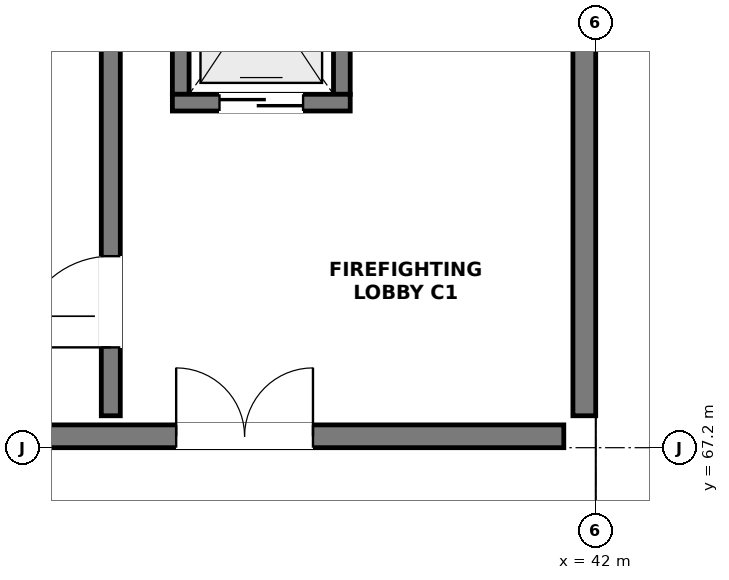
"""IFC4 building model, lengths in metres.
Left out: names, types, materials, properties, quantities, classifications, styles, units other than length and angle.
Written with IfcOpenShell. Run it as: python <this file> out.ifc"""

import sys

from ifc_helpers import new_model, si_unit, direction, frame, frame_2d, origin, place, context, subcontext, project, spatial, rectangle, extrude, element, fill, save


model = new_model("IFC4")
c1 = context("Model", 3, precision=1e-05, world=origin(), true_north=direction((0.0, 1.0)))
c2 = subcontext(c1, "Body", "Model", "MODEL_VIEW")
j1 = project(units=[si_unit("LENGTHUNIT", "METRE"), si_unit("PLANEANGLEUNIT", "RADIAN")], contexts=[c1])
p1 = place(None, origin())
s1 = spatial("IfcSite", under=j1, at=p1, CompositionType="ELEMENT")
p2 = place(p1, origin())
s2 = spatial("IfcBuilding", under=s1, at=p2, CompositionType="ELEMENT")
p3 = place(p2, frame((0.0, 0.0, 21.6)))
s3 = spatial("IfcBuildingStorey", under=s2, at=p3, CompositionType="ELEMENT", Elevation=21.6)
p4 = place(p3, frame((25.62, 67.35, 0.0), z_axis=(0.0, 0.0, 1.0), x_axis=(1.0, 0.0, 0.0)))
e1 = element("IfcWall", 1, at=p4, inside=s3, PredefinedType="SHEAR", context=c2, shape_type="SweptSolid", body=[
    extrude(rectangle(XDim=15.96, YDim=0.3, at=frame_2d((7.98, 0.0))), origin(), (0.0, 0.0, 1.0), 3.64),
])
p5 = place(p4, frame((10.86, 0.0, 0.0)))
e2 = element("IfcOpeningElement", 2, at=p5, cuts=e1, PredefinedType="OPENING", context=c2, shape_type="SweptSolid", body=[
    extrude(rectangle(XDim=1.8, YDim=2.2, at=frame_2d((0.9, 1.1))), frame((0.0, 0.162, 0.0), z_axis=(0.0, -1.0, 0.0), x_axis=(1.0, 0.0, 0.0)), (0.0, 0.0, 1.0), 0.324),
])
p6 = place(p3, frame((41.85, 67.62, 0.0), z_axis=(0.0, 0.0, 1.0), x_axis=(0.0, 1.0, 0.0)))
e3 = element("IfcWall", 3, at=p6, inside=s3, PredefinedType="SHEAR", context=c2, shape_type="SweptSolid", body=[
    extrude(rectangle(XDim=7.56, YDim=0.3, at=frame_2d((3.78, 0.0))), origin(), (0.0, 0.0, 1.0), 3.64),
])
p7 = place(p3, frame((35.62, 67.62, 0.0), z_axis=(0.0, 0.0, 1.0), x_axis=(0.0, 1.0, 0.0)))
e4 = element("IfcWall", 4, at=p7, inside=s3, PredefinedType="SHEAR", context=c2, shape_type="SweptSolid", body=[
    extrude(rectangle(XDim=7.56, YDim=0.25, at=frame_2d((3.78, 0.0))), origin(), (0.0, 0.0, 1.0), 3.64),
])
p8 = place(p7, frame((0.9, 0.0, 0.0)))
e5 = element("IfcOpeningElement", 5, at=p8, cuts=e4, PredefinedType="OPENING", context=c2, shape_type="SweptSolid", body=[
    extrude(rectangle(XDim=1.2, YDim=2.2, at=frame_2d((0.6, 1.1))), frame((0.0, 0.137, 0.0), z_axis=(0.0, -1.0, 0.0), x_axis=(1.0, 0.0, 0.0)), (0.0, 0.0, 1.0), 0.274),
])
for number, where, z_axis, x_axis in (
    (6, (36.54, 71.85, 0.0), (0.0, 0.0, 1.0), (0.0, 1.0, 0.0)),
    (7, (38.66, 71.85, 0.0), (0.0, 0.0, 1.0), (0.0, 1.0, 0.0)),
):
    element("IfcWall", number, at=place(p3, frame(where, z_axis=z_axis, x_axis=x_axis)), inside=s3, PredefinedType="SOLIDWALL", context=c2, shape_type="SweptSolid", body=[
        extrude(rectangle(XDim=2.7, YDim=0.22, at=frame_2d((1.35, 0.0))), origin(), (0.0, 0.0, 1.0), 3.64),
    ])
p9 = place(p3, frame((36.43, 71.74, 0.0), z_axis=(0.0, 0.0, 1.0), x_axis=(1.0, 0.0, 0.0)))
e8 = element("IfcWall", 8, at=p9, inside=s3, PredefinedType="SOLIDWALL", context=c2, shape_type="SweptSolid", body=[
    extrude(rectangle(XDim=2.34, YDim=0.22, at=frame_2d((1.17, 0.0))), origin(), (0.0, 0.0, 1.0), 3.64),
])
p10 = place(p9, frame((0.62, 0.0, 0.0)))
e9 = element("IfcOpeningElement", 9, at=p10, cuts=e8, PredefinedType="OPENING", context=c2, shape_type="SweptSolid", body=[
    extrude(rectangle(XDim=1.1, YDim=2.15, at=frame_2d((0.55, 1.075))), frame((0.0, 0.122, 0.0), z_axis=(0.0, -1.0, 0.0), x_axis=(1.0, 0.0, 0.0)), (0.0, 0.0, 1.0), 0.244),
])
p11 = place(p5, origin())
e10 = element("IfcDoor", 10, at=p11, inside=s3, OperationType="DOUBLE_DOOR_SINGLE_SWING", PredefinedType="DOOR", context=c2, shape_type="SweptSolid", body=[
    extrude(rectangle(XDim=1.8, YDim=2.2, at=frame_2d((0.9, 1.1))), frame((0.0, 0.025, 0.0), z_axis=(0.0, -1.0, 0.0), x_axis=(1.0, 0.0, 0.0)), (0.0, 0.0, 1.0), 0.05),
])
fill(e2, e10)
p12 = place(p8, origin())
e11 = element("IfcDoor", 11, at=p12, inside=s3, OperationType="SINGLE_SWING_LEFT", PredefinedType="DOOR", context=c2, shape_type="SweptSolid", body=[
    extrude(rectangle(XDim=1.2, YDim=2.2, at=frame_2d((0.6, 1.1))), frame((0.0, 0.025, 0.0), z_axis=(0.0, -1.0, 0.0), x_axis=(1.0, 0.0, 0.0)), (0.0, 0.0, 1.0), 0.05),
])
fill(e5, e11)
p13 = place(p10, origin())
e12 = element("IfcDoor", 12, at=p13, inside=s3, OperationType="DOUBLE_DOOR_SLIDING", PredefinedType="DOOR", context=c2, shape_type="SweptSolid", body=[
    extrude(rectangle(XDim=1.1, YDim=2.15, at=frame_2d((0.55, 1.075))), frame((0.0, 0.025, 0.0), z_axis=(0.0, -1.0, 0.0), x_axis=(1.0, 0.0, 0.0)), (0.0, 0.0, 1.0), 0.05),
])
fill(e9, e12)
save(model, sys.argv[1])
